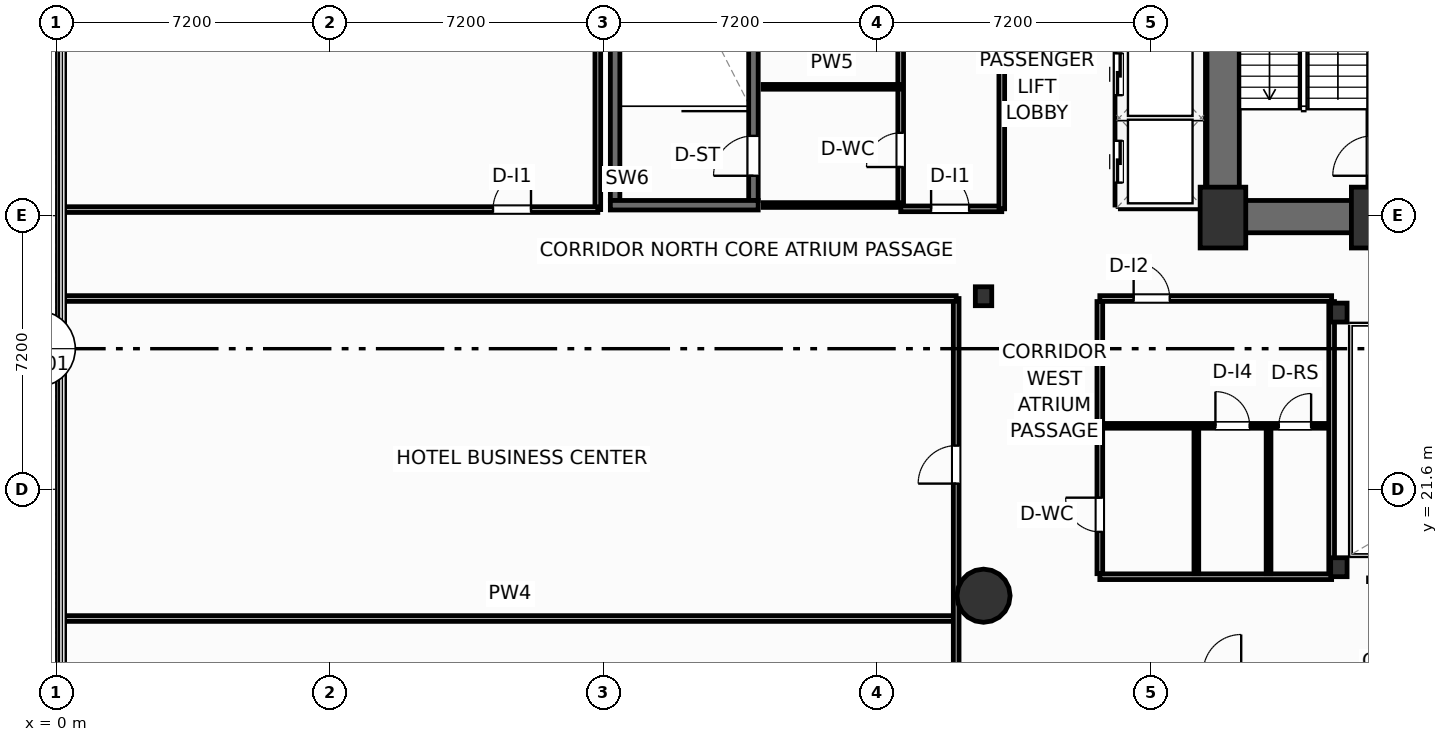
"""IFC4 building model, lengths in metres.
Left out: names, types, materials, properties, quantities, classifications, styles, units other than length and angle.
Written with IfcOpenShell. Run it as: python <this file> out.ifc"""

import sys

from ifc_helpers import new_model, si_unit, direction, frame, frame_2d, origin, origin_2d, place, context, subcontext, project, spatial, rectangle, circle, i_section, extrude, element, fill, save


model = new_model("IFC4")
c1 = context("Model", 3, precision=1e-05, world=origin(), true_north=direction((0.0, 1.0)))
c2 = subcontext(c1, "Body", "Model", "MODEL_VIEW")
j1 = project(units=[si_unit("LENGTHUNIT", "METRE"), si_unit("PLANEANGLEUNIT", "RADIAN")], contexts=[c1])
p1 = place(None, origin())
s1 = spatial("IfcSite", under=j1, at=p1, CompositionType="ELEMENT")
p2 = place(p1, origin())
s2 = spatial("IfcBuilding", under=s1, at=p2, CompositionType="ELEMENT")
p3 = place(p2, frame((0.0, 0.0, 21.6)))
s3 = spatial("IfcBuildingStorey", under=s2, at=p3, CompositionType="ELEMENT", Elevation=21.6)
for number, where, z_axis, x_axis in (
    (1, (30.7, 28.75, 0.0), (0.0, 0.0, 1.0), (1.0, 0.0, 0.0)),
    (2, (34.68, 28.75, 0.0), (0.0, 0.0, 1.0), (1.0, 0.0, 0.0)),
):
    element("IfcColumn", number, at=place(p3, frame(where, z_axis=z_axis, x_axis=x_axis)), inside=s3, PredefinedType="COLUMN", context=c2, shape_type="SweptSolid", body=[
        extrude(rectangle(XDim=1.2, YDim=1.6, at=origin_2d()), origin(), (0.0, 0.0, 1.0), 5.4),
    ])
for number, where, z_axis, x_axis in (
    (3, (33.75, 19.55, 0.0), (0.0, 0.0, 1.0), (1.0, 0.0, 0.0)),
    (4, (33.75, 26.25, 0.0), (0.0, 0.0, 1.0), (1.0, 0.0, 0.0)),
    (5, (24.4, 26.68, 0.0), (0.0, 0.0, 1.0), (1.0, 0.0, 0.0)),
):
    element("IfcColumn", number, at=place(p3, frame(where, z_axis=z_axis, x_axis=x_axis)), inside=s3, PredefinedType="COLUMN", context=c2, shape_type="SweptSolid", body=[
        extrude(i_section(OverallWidth=0.432, OverallDepth=0.498, WebThickness=0.056, FlangeThickness=0.089, FilletRadius=0.025, at=origin_2d()), origin(), (0.0, 0.0, 1.0), 5.4),
    ])
p4 = place(p3, frame((30.705, 29.2, 0.0), z_axis=(0.0, 0.0, 1.0), x_axis=(0.0, 1.0, 0.0)))
e6 = element("IfcWall", 6, at=p4, inside=s3, PredefinedType="SHEAR", context=c2, shape_type="SweptSolid", body=[
    extrude(rectangle(XDim=9.22, YDim=0.85, at=frame_2d((4.61, 0.0))), origin(), (0.0, 0.0, 1.0), 5.15),
])
p5 = place(p3, frame((30.28, 28.775, 0.0), z_axis=(0.0, 0.0, 1.0), x_axis=(1.0, 0.0, 0.0)))
e7 = element("IfcWall", 7, at=p5, inside=s3, PredefinedType="SHEAR", context=c2, shape_type="SweptSolid", body=[
    extrude(rectangle(XDim=4.52, YDim=0.85, at=frame_2d((2.26, 0.0))), origin(), (0.0, 0.0, 1.0), 5.15),
])
p6 = place(p3, frame((34.64, 29.2, 0.0), z_axis=(0.0, 0.0, 1.0), x_axis=(0.0, 1.0, 0.0)))
e8 = element("IfcWall", 8, at=p6, inside=s3, PredefinedType="SHEAR", context=c2, shape_type="SweptSolid", body=[
    extrude(rectangle(XDim=9.22, YDim=0.25, at=frame_2d((4.61, 0.0))), origin(), (0.0, 0.0, 1.0), 5.15),
])
p7 = place(p6, frame((0.65, 0.0, 0.0)))
e9 = element("IfcOpeningElement", 9, at=p7, cuts=e8, PredefinedType="OPENING", context=c2, shape_type="SweptSolid", body=[
    extrude(rectangle(XDim=1.05, YDim=2.15, at=frame_2d((0.525, 1.075))), frame((0.0, 0.135, 0.0), z_axis=(0.0, -1.0, 0.0), x_axis=(1.0, 0.0, 0.0)), (0.0, 0.0, 1.0), 0.27),
])
p8 = place(p3, frame((14.705, 29.2, 0.0), z_axis=(0.0, 0.0, 1.0), x_axis=(0.0, 1.0, 0.0)))
e10 = element("IfcWall", 10, at=p8, inside=s3, PredefinedType="SHEAR", context=c2, shape_type="SweptSolid", body=[
    extrude(rectangle(XDim=9.22, YDim=0.25, at=frame_2d((4.61, 0.0))), origin(), (0.0, 0.0, 1.0), 5.15),
])
p9 = place(p3, frame((18.345, 29.2, 0.0), z_axis=(0.0, 0.0, 1.0), x_axis=(0.0, 1.0, 0.0)))
e11 = element("IfcWall", 11, at=p9, inside=s3, PredefinedType="SHEAR", context=c2, shape_type="SweptSolid", body=[
    extrude(rectangle(XDim=9.22, YDim=0.25, at=frame_2d((4.61, 0.0))), origin(), (0.0, 0.0, 1.0), 5.15),
])
p10 = place(p9, frame((0.65, 0.0, 0.0)))
e12 = element("IfcOpeningElement", 12, at=p10, cuts=e11, PredefinedType="OPENING", context=c2, shape_type="SweptSolid", body=[
    extrude(rectangle(XDim=1.05, YDim=2.15, at=frame_2d((0.525, 1.075))), frame((0.0, 0.135, 0.0), z_axis=(0.0, -1.0, 0.0), x_axis=(1.0, 0.0, 0.0)), (0.0, 0.0, 1.0), 0.27),
])
p11 = place(p3, frame((14.58, 29.075, 0.0), z_axis=(0.0, 0.0, 1.0), x_axis=(1.0, 0.0, 0.0)))
e13 = element("IfcWall", 13, at=p11, inside=s3, PredefinedType="SHEAR", context=c2, shape_type="SweptSolid", body=[
    extrude(rectangle(XDim=3.89, YDim=0.25, at=frame_2d((1.945, 0.0))), origin(), (0.0, 0.0, 1.0), 5.15),
])
p12 = place(p3, frame((24.4, 18.8, 0.0), z_axis=(0.0, 0.0, 1.0), x_axis=(1.0, 0.0, 0.0)))
e14 = element("IfcColumn", 14, at=p12, inside=s3, PredefinedType="COLUMN", context=c2, shape_type="SweptSolid", body=[
    extrude(circle(Radius=0.7, at=origin_2d()), origin(), (0.0, 0.0, 1.0), 5.4),
])
p13 = place(p3, frame((22.22, 28.98, 0.0), z_axis=(0.0, 0.0, 1.0), x_axis=(1.0, 0.0, 0.0)))
e15 = element("IfcWall", 15, at=p13, inside=s3, PredefinedType="PARTITIONING", context=c2, shape_type="SweptSolid", body=[
    extrude(rectangle(XDim=2.66, YDim=0.15, at=frame_2d((1.33, 0.0))), origin(), (0.0, 0.0, 1.0), 5.15),
])
p14 = place(p13, frame((0.8, 0.0, 0.0)))
e16 = element("IfcOpeningElement", 16, at=p14, cuts=e15, PredefinedType="OPENING", context=c2, shape_type="SweptSolid", body=[
    extrude(rectangle(XDim=1.0, YDim=2.05, at=frame_2d((0.5, 1.025))), frame((0.0, 0.085, 0.0), z_axis=(0.0, -1.0, 0.0), x_axis=(1.0, 0.0, 0.0)), (0.0, 0.0, 1.0), 0.17),
])
p15 = place(p3, frame((24.88, 28.98, 0.0), z_axis=(0.0, 0.0, 1.0), x_axis=(0.0, 1.0, 0.0)))
e17 = element("IfcWall", 17, at=p15, inside=s3, PredefinedType="PARTITIONING", context=c2, shape_type="SweptSolid", body=[
    extrude(rectangle(XDim=9.58, YDim=0.15, at=frame_2d((4.79, 0.0))), origin(), (0.0, 0.0, 1.0), 5.15),
])
p16 = place(p3, frame((22.22, 29.08, 0.0), z_axis=(0.0, 0.0, 1.0), x_axis=(0.0, 1.0, 0.0)))
e18 = element("IfcWall", 18, at=p16, inside=s3, PredefinedType="PARTITIONING", context=c2, shape_type="SweptSolid", body=[
    extrude(rectangle(XDim=9.3, YDim=0.15, at=frame_2d((4.65, 0.0))), origin(), (0.0, 0.0, 1.0), 5.15),
])
p17 = place(p16, frame((1.0, 0.0, 0.0)))
e19 = element("IfcOpeningElement", 19, at=p17, cuts=e18, PredefinedType="OPENING", context=c2, shape_type="SweptSolid", body=[
    extrude(rectangle(XDim=0.9, YDim=2.05, at=frame_2d((0.45, 1.025))), frame((0.0, 0.085, 0.0), z_axis=(0.0, -1.0, 0.0), x_axis=(1.0, 0.0, 0.0)), (0.0, 0.0, 1.0), 0.17),
])
p18 = place(p16, frame((4.1, 0.0, 0.0)))
e20 = element("IfcOpeningElement", 20, at=p18, cuts=e18, PredefinedType="OPENING", context=c2, shape_type="SweptSolid", body=[
    extrude(rectangle(XDim=0.9, YDim=2.05, at=frame_2d((0.45, 1.025))), frame((0.0, 0.085, 0.0), z_axis=(0.0, -1.0, 0.0), x_axis=(1.0, 0.0, 0.0)), (0.0, 0.0, 1.0), 0.17),
])
p19 = place(p16, frame((7.15, 0.0, 0.0)))
e21 = element("IfcOpeningElement", 21, at=p19, cuts=e18, PredefinedType="OPENING", context=c2, shape_type="SweptSolid", body=[
    extrude(rectangle(XDim=0.9, YDim=2.05, at=frame_2d((0.45, 1.025))), frame((0.0, 0.085, 0.0), z_axis=(0.0, -1.0, 0.0), x_axis=(1.0, 0.0, 0.0)), (0.0, 0.0, 1.0), 0.17),
])
for number, where, z_axis, x_axis in (
    (22, (18.6, 29.08, 0.0), (0.0, 0.0, 1.0), (1.0, 0.0, 0.0)),
    (23, (18.6, 32.19, 0.0), (0.0, 0.0, 1.0), (1.0, 0.0, 0.0)),
):
    element("IfcWall", number, at=place(p3, frame(where, z_axis=z_axis, x_axis=x_axis)), inside=s3, PredefinedType="PARTITIONING", context=c2, shape_type="SweptSolid", body=[
        extrude(rectangle(XDim=3.62, YDim=0.125, at=frame_2d((1.81, 0.0))), origin(), (0.0, 0.0, 1.0), 5.15),
    ])
p20 = place(p3, frame((0.2, 18.2, 0.0), z_axis=(0.0, 0.0, 1.0), x_axis=(1.0, 0.0, 0.0)))
e24 = element("IfcWall", 24, at=p20, inside=s3, PredefinedType="PARTITIONING", context=c2, shape_type="SweptSolid", body=[
    extrude(rectangle(XDim=23.48, YDim=0.15, at=frame_2d((11.74, 0.0))), origin(), (0.0, 0.0, 1.0), 1.935),
])
p21 = place(p3, frame((23.68, 0.25, 0.0), z_axis=(0.0, 0.0, 1.0), x_axis=(0.0, 1.0, 0.0)))
e25 = element("IfcWall", 25, at=p21, inside=s3, PredefinedType="PARTITIONING", context=c2, shape_type="SweptSolid", body=[
    extrude(rectangle(XDim=26.37, YDim=0.15, at=frame_2d((13.185, 0.0))), origin(), (0.0, 0.0, 1.0), 5.15),
])
p22 = place(p21, frame((21.5, 0.0, 0.0)))
e26 = element("IfcOpeningElement", 26, at=p22, cuts=e25, PredefinedType="OPENING", context=c2, shape_type="SweptSolid", body=[
    extrude(rectangle(XDim=1.0, YDim=2.05, at=frame_2d((0.5, 1.025))), frame((0.0, 0.085, 0.0), z_axis=(0.0, -1.0, 0.0), x_axis=(1.0, 0.0, 0.0)), (0.0, 0.0, 1.0), 0.17),
])
p23 = place(p21, frame((13.2, 0.0, 0.0)))
e27 = element("IfcOpeningElement", 27, at=p23, cuts=e25, PredefinedType="OPENING", context=c2, shape_type="SweptSolid", body=[
    extrude(rectangle(XDim=1.0, YDim=2.05, at=frame_2d((0.5, 1.025))), frame((0.0, 0.085, 0.0), z_axis=(0.0, -1.0, 0.0), x_axis=(1.0, 0.0, 0.0)), (0.0, 0.0, 1.0), 0.17),
])
p24 = place(p3, frame((0.2, 26.62, 0.0), z_axis=(0.0, 0.0, 1.0), x_axis=(1.0, 0.0, 0.0)))
e28 = element("IfcWall", 28, at=p24, inside=s3, PredefinedType="PARTITIONING", context=c2, shape_type="SweptSolid", body=[
    extrude(rectangle(XDim=23.48, YDim=0.15, at=frame_2d((11.74, 0.0))), origin(), (0.0, 0.0, 1.0), 5.15),
])
p25 = place(p3, frame((14.25, 28.96, 0.0), z_axis=(0.0, 0.0, 1.0), x_axis=(0.0, 1.0, 0.0)))
e29 = element("IfcWall", 29, at=p25, inside=s3, PredefinedType="PARTITIONING", context=c2, shape_type="SweptSolid", body=[
    extrude(rectangle(XDim=21.34, YDim=0.15, at=frame_2d((10.67, 0.0))), origin(), (0.0, 0.0, 1.0), 5.15),
])
p26 = place(p3, frame((0.2, 28.96, 0.0), z_axis=(0.0, 0.0, 1.0), x_axis=(1.0, 0.0, 0.0)))
e30 = element("IfcWall", 30, at=p26, inside=s3, PredefinedType="PARTITIONING", context=c2, shape_type="SweptSolid", body=[
    extrude(rectangle(XDim=14.05, YDim=0.15, at=frame_2d((7.025, 0.0))), origin(), (0.0, 0.0, 1.0), 5.15),
])
p27 = place(p26, frame((11.292, 0.0, 0.0)))
e31 = element("IfcOpeningElement", 31, at=p27, cuts=e30, PredefinedType="OPENING", context=c2, shape_type="SweptSolid", body=[
    extrude(rectangle(XDim=1.0, YDim=2.05, at=frame_2d((0.5, 1.025))), frame((0.0, 0.085, 0.0), z_axis=(0.0, -1.0, 0.0), x_axis=(1.0, 0.0, 0.0)), (0.0, 0.0, 1.0), 0.17),
])
p28 = place(p3, frame((27.46, 26.62, 0.0), z_axis=(0.0, 0.0, 1.0), x_axis=(1.0, 0.0, 0.0)))
e32 = element("IfcWall", 32, at=p28, inside=s3, PredefinedType="PARTITIONING", context=c2, shape_type="SweptSolid", body=[
    extrude(rectangle(XDim=6.1, YDim=0.15, at=frame_2d((3.05, 0.0))), origin(), (0.0, 0.0, 1.0), 4.362),
])
p29 = place(p28, frame((0.89, 0.0, 0.0)))
e33 = element("IfcOpeningElement", 33, at=p29, cuts=e32, PredefinedType="OPENING", context=c2, shape_type="SweptSolid", body=[
    extrude(rectangle(XDim=0.95, YDim=2.05, at=frame_2d((0.475, 1.025))), frame((0.0, 0.085, 0.0), z_axis=(0.0, -1.0, 0.0), x_axis=(1.0, 0.0, 0.0)), (0.0, 0.0, 1.0), 0.17),
])
p30 = place(p3, frame((27.46, 19.3, 0.0), z_axis=(0.0, 0.0, 1.0), x_axis=(1.0, 0.0, 0.0)))
e34 = element("IfcWall", 34, at=p30, inside=s3, PredefinedType="PARTITIONING", context=c2, shape_type="SweptSolid", body=[
    extrude(rectangle(XDim=6.1, YDim=0.15, at=frame_2d((3.05, 0.0))), origin(), (0.0, 0.0, 1.0), 4.362),
])
p31 = place(p3, frame((27.52, 23.27, 0.0), z_axis=(0.0, 0.0, 1.0), x_axis=(1.0, 0.0, 0.0)))
e35 = element("IfcWall", 35, at=p31, inside=s3, PredefinedType="PARTITIONING", context=c2, shape_type="SweptSolid", body=[
    extrude(rectangle(XDim=6.0, YDim=0.125, at=frame_2d((3.0, 0.0))), origin(), (0.0, 0.0, 1.0), 5.15),
])
p32 = place(p31, frame((2.982, 0.0, 0.0)))
e36 = element("IfcOpeningElement", 36, at=p32, cuts=e35, PredefinedType="OPENING", context=c2, shape_type="SweptSolid", body=[
    extrude(rectangle(XDim=0.9, YDim=2.05, at=frame_2d((0.45, 1.025))), frame((0.0, 0.073, 0.0), z_axis=(0.0, -1.0, 0.0), x_axis=(1.0, 0.0, 0.0)), (0.0, 0.0, 1.0), 0.145),
])
p33 = place(p31, frame((4.65, 0.0, 0.0)))
e37 = element("IfcOpeningElement", 37, at=p33, cuts=e35, PredefinedType="OPENING", context=c2, shape_type="SweptSolid", body=[
    extrude(rectangle(XDim=0.85, YDim=2.05, at=frame_2d((0.425, 1.025))), frame((0.0, 0.073, 0.0), z_axis=(0.0, -1.0, 0.0), x_axis=(1.0, 0.0, 0.0)), (0.0, 0.0, 1.0), 0.145),
])
for number, where, z_axis, x_axis in (
    (38, (30.0, 19.38, 0.0), (0.0, 0.0, 1.0), (0.0, 1.0, 0.0)),
    (39, (31.9, 19.38, 0.0), (0.0, 0.0, 1.0), (0.0, 1.0, 0.0)),
):
    element("IfcWall", number, at=place(p3, frame(where, z_axis=z_axis, x_axis=x_axis)), inside=s3, PredefinedType="PARTITIONING", context=c2, shape_type="SweptSolid", body=[
        extrude(rectangle(XDim=3.82, YDim=0.125, at=frame_2d((1.91, 0.0))), origin(), (0.0, 0.0, 1.0), 5.15),
    ])
p34 = place(p3, frame((27.46, 19.38, 0.0), z_axis=(0.0, 0.0, 1.0), x_axis=(0.0, 1.0, 0.0)))
e40 = element("IfcWall", 40, at=p34, inside=s3, PredefinedType="PARTITIONING", context=c2, shape_type="SweptSolid", body=[
    extrude(rectangle(XDim=7.16, YDim=0.15, at=frame_2d((3.58, 0.0))), origin(), (0.0, 0.0, 1.0), 5.15),
])
p35 = place(p34, frame((1.1, 0.0, 0.0)))
e41 = element("IfcOpeningElement", 41, at=p35, cuts=e40, PredefinedType="OPENING", context=c2, shape_type="SweptSolid", body=[
    extrude(rectangle(XDim=0.9, YDim=2.05, at=frame_2d((0.45, 1.025))), frame((0.0, 0.085, 0.0), z_axis=(0.0, -1.0, 0.0), x_axis=(1.0, 0.0, 0.0)), (0.0, 0.0, 1.0), 0.17),
])
p36 = place(p3, frame((33.56, 19.38, 0.0), z_axis=(0.0, 0.0, 1.0), x_axis=(0.0, 1.0, 0.0)))
e42 = element("IfcWall", 42, at=p36, inside=s3, PredefinedType="PARTITIONING", context=c2, shape_type="SweptSolid", body=[
    extrude(rectangle(XDim=7.16, YDim=0.15, at=frame_2d((3.58, 0.0))), origin(), (0.0, 0.0, 1.0), 4.524),
])
p37 = place(p3, frame((28.02, 31.375, 0.0), z_axis=(0.0, 0.0, 1.0), x_axis=(1.0, 0.0, 0.0)))
e43 = element("IfcWall", 43, at=p37, inside=s3, PredefinedType="PARTITIONING", context=c2, shape_type="SweptSolid", body=[
    extrude(rectangle(XDim=2.06, YDim=0.2, at=frame_2d((1.03, 0.0))), origin(), (0.0, 0.0, 1.0), 5.15),
])
p38 = place(p3, frame((28.0, 29.08, 0.0), z_axis=(0.0, 0.0, 1.0), x_axis=(1.0, 0.0, 0.0)))
e44 = element("IfcWall", 44, at=p38, inside=s3, PredefinedType="PARTITIONING", context=c2, shape_type="SweptSolid", body=[
    extrude(rectangle(XDim=2.1, YDim=0.2, at=frame_2d((1.05, 0.0))), origin(), (0.0, 0.0, 1.0), 5.15),
])
p39 = place(p3, frame((30.12, 29.08, 0.0), z_axis=(0.0, 0.0, 1.0), x_axis=(0.0, 1.0, 0.0)))
e45 = element("IfcWall", 45, at=p39, inside=s3, PredefinedType="PARTITIONING", context=c2, shape_type="SweptSolid", body=[
    extrude(rectangle(XDim=6.89, YDim=0.2, at=frame_2d((3.445, 0.0))), origin(), (0.0, 0.0, 1.0), 5.15),
])
p40 = place(p3, frame((27.96, 29.08, 0.0), z_axis=(0.0, 0.0, 1.0), x_axis=(0.0, 1.0, 0.0)))
e46 = element("IfcWall", 46, at=p40, inside=s3, PredefinedType="PARTITIONING", context=c2, shape_type="SweptSolid", body=[
    extrude(rectangle(XDim=6.89, YDim=0.2, at=frame_2d((3.445, 0.0))), origin(), (0.0, 0.0, 1.0), 5.15),
])
p41 = place(p40, frame((0.59, 0.0, 0.0)))
e47 = element("IfcOpeningElement", 47, at=p41, cuts=e46, PredefinedType="OPENING", context=c2, shape_type="SweptSolid", body=[
    extrude(rectangle(XDim=1.1, YDim=2.15, at=frame_2d((0.55, 1.075))), frame((0.0, 0.11, 0.0), z_axis=(0.0, -1.0, 0.0), x_axis=(1.0, 0.0, 0.0)), (0.0, 0.0, 1.0), 0.22),
])
p42 = place(p40, frame((2.89, 0.0, 0.0)))
e48 = element("IfcOpeningElement", 48, at=p42, cuts=e46, PredefinedType="OPENING", context=c2, shape_type="SweptSolid", body=[
    extrude(rectangle(XDim=1.1, YDim=2.15, at=frame_2d((0.55, 1.075))), frame((0.0, 0.11, 0.0), z_axis=(0.0, -1.0, 0.0), x_axis=(1.0, 0.0, 0.0)), (0.0, 0.0, 1.0), 0.22),
])
p43 = place(p40, frame((5.19, 0.0, 0.0)))
e49 = element("IfcOpeningElement", 49, at=p43, cuts=e46, PredefinedType="OPENING", context=c2, shape_type="SweptSolid", body=[
    extrude(rectangle(XDim=1.1, YDim=2.15, at=frame_2d((0.55, 1.075))), frame((0.0, 0.11, 0.0), z_axis=(0.0, -1.0, 0.0), x_axis=(1.0, 0.0, 0.0)), (0.0, 0.0, 1.0), 0.22),
])
p44 = place(p14, origin())
e50 = element("IfcDoor", 50, at=p44, inside=s3, OperationType="SINGLE_SWING_LEFT", PredefinedType="DOOR", context=c2, shape_type="SweptSolid", body=[
    extrude(rectangle(XDim=1.0, YDim=2.05, at=frame_2d((0.5, 1.025))), frame((0.0, 0.025, 0.0), z_axis=(0.0, -1.0, 0.0), x_axis=(1.0, 0.0, 0.0)), (0.0, 0.0, 1.0), 0.05),
])
fill(e16, e50)
p45 = place(p17, origin())
e51 = element("IfcDoor", 51, at=p45, inside=s3, OperationType="SINGLE_SWING_LEFT", PredefinedType="DOOR", context=c2, shape_type="SweptSolid", body=[
    extrude(rectangle(XDim=0.9, YDim=2.05, at=frame_2d((0.45, 1.025))), frame((0.0, 0.025, 0.0), z_axis=(0.0, -1.0, 0.0), x_axis=(1.0, 0.0, 0.0)), (0.0, 0.0, 1.0), 0.05),
])
fill(e19, e51)
p46 = place(p22, origin())
e52 = element("IfcDoor", 52, at=p46, inside=s3, OperationType="SINGLE_SWING_LEFT", PredefinedType="DOOR", context=c2, shape_type="SweptSolid", body=[
    extrude(rectangle(XDim=1.0, YDim=2.05, at=frame_2d((0.5, 1.025))), frame((0.0, 0.025, 0.0), z_axis=(0.0, -1.0, 0.0), x_axis=(1.0, 0.0, 0.0)), (0.0, 0.0, 1.0), 0.05),
])
fill(e26, e52)
p47 = place(p27, origin())
e53 = element("IfcDoor", 53, at=p47, inside=s3, OperationType="SINGLE_SWING_RIGHT", PredefinedType="DOOR", context=c2, shape_type="SweptSolid", body=[
    extrude(rectangle(XDim=1.0, YDim=2.05, at=frame_2d((0.5, 1.025))), frame((0.0, 0.025, 0.0), z_axis=(0.0, -1.0, 0.0), x_axis=(1.0, 0.0, 0.0)), (0.0, 0.0, 1.0), 0.05),
])
fill(e31, e53)
p48 = place(p10, origin())
e54 = element("IfcDoor", 54, at=p48, inside=s3, OperationType="SINGLE_SWING_LEFT", PredefinedType="DOOR", context=c2, shape_type="SweptSolid", body=[
    extrude(rectangle(XDim=1.05, YDim=2.15, at=frame_2d((0.525, 1.075))), frame((0.0, 0.025, 0.0), z_axis=(0.0, -1.0, 0.0), x_axis=(1.0, 0.0, 0.0)), (0.0, 0.0, 1.0), 0.05),
])
fill(e12, e54)
p49 = place(p29, origin())
e55 = element("IfcDoor", 55, at=p49, inside=s3, OperationType="SINGLE_SWING_LEFT", PredefinedType="DOOR", context=c2, shape_type="SweptSolid", body=[
    extrude(rectangle(XDim=0.95, YDim=2.05, at=frame_2d((0.475, 1.025))), frame((0.0, 0.025, 0.0), z_axis=(0.0, -1.0, 0.0), x_axis=(1.0, 0.0, 0.0)), (0.0, 0.0, 1.0), 0.05),
])
fill(e33, e55)
p50 = place(p32, origin())
e56 = element("IfcDoor", 56, at=p50, inside=s3, OperationType="SINGLE_SWING_LEFT", PredefinedType="DOOR", context=c2, shape_type="SweptSolid", body=[
    extrude(rectangle(XDim=0.9, YDim=2.05, at=frame_2d((0.45, 1.025))), frame((0.0, 0.025, 0.0), z_axis=(0.0, -1.0, 0.0), x_axis=(1.0, 0.0, 0.0)), (0.0, 0.0, 1.0), 0.05),
])
fill(e36, e56)
p51 = place(p33, origin())
e57 = element("IfcDoor", 57, at=p51, inside=s3, OperationType="SINGLE_SWING_RIGHT", PredefinedType="DOOR", context=c2, shape_type="SweptSolid", body=[
    extrude(rectangle(XDim=0.85, YDim=2.05, at=frame_2d((0.425, 1.025))), frame((0.0, 0.025, 0.0), z_axis=(0.0, -1.0, 0.0), x_axis=(1.0, 0.0, 0.0)), (0.0, 0.0, 1.0), 0.05),
])
fill(e37, e57)
p52 = place(p35, origin())
e58 = element("IfcDoor", 58, at=p52, inside=s3, OperationType="SINGLE_SWING_RIGHT", PredefinedType="DOOR", context=c2, shape_type="SweptSolid", body=[
    extrude(rectangle(XDim=0.9, YDim=2.05, at=frame_2d((0.45, 1.025))), frame((0.0, 0.025, 0.0), z_axis=(0.0, -1.0, 0.0), x_axis=(1.0, 0.0, 0.0)), (0.0, 0.0, 1.0), 0.05),
])
fill(e41, e58)
p53 = place(p41, origin())
e59 = element("IfcDoor", 59, at=p53, inside=s3, OperationType="SLIDING_TO_LEFT", PredefinedType="DOOR", context=c2, shape_type="SweptSolid", body=[
    extrude(rectangle(XDim=1.1, YDim=2.15, at=frame_2d((0.55, 1.075))), frame((0.0, 0.025, 0.0), z_axis=(0.0, -1.0, 0.0), x_axis=(1.0, 0.0, 0.0)), (0.0, 0.0, 1.0), 0.05),
])
fill(e47, e59)
p54 = place(p42, origin())
e60 = element("IfcDoor", 60, at=p54, inside=s3, OperationType="SLIDING_TO_LEFT", PredefinedType="DOOR", context=c2, shape_type="SweptSolid", body=[
    extrude(rectangle(XDim=1.1, YDim=2.15, at=frame_2d((0.55, 1.075))), frame((0.0, 0.025, 0.0), z_axis=(0.0, -1.0, 0.0), x_axis=(1.0, 0.0, 0.0)), (0.0, 0.0, 1.0), 0.05),
])
fill(e48, e60)
save(model, sys.argv[1])
